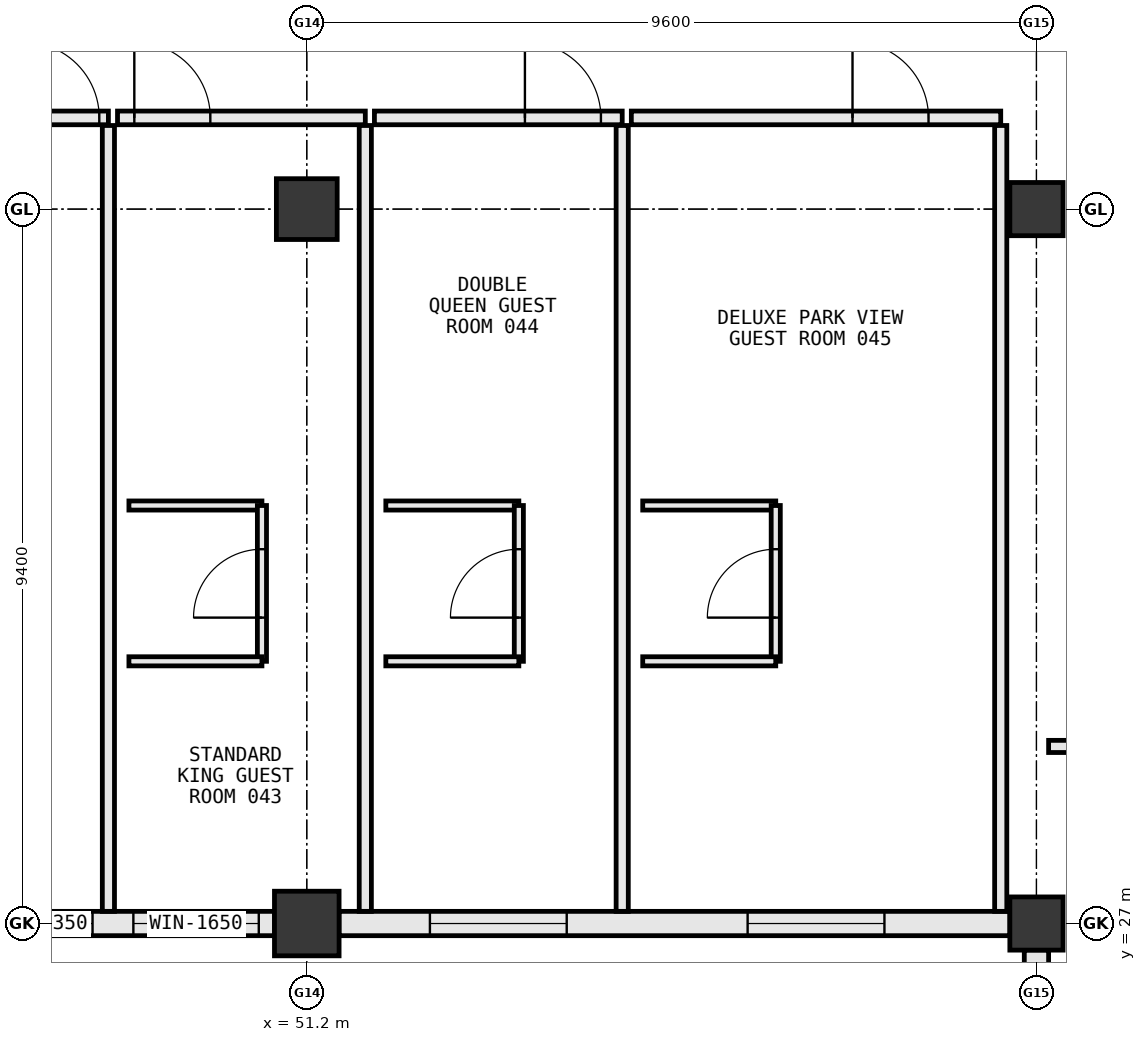
"""IFC4 building model, lengths in metres.
Left out: names, types, materials, properties, quantities, classifications, styles, units other than length and angle.
Written with IfcOpenShell. Run it as: python <this file> out.ifc"""

import sys

from ifc_helpers import new_model, si_unit, direction, frame, frame_2d, origin, origin_2d, place, context, subcontext, project, spatial, rectangle, extrude, element, fill, save


model = new_model("IFC4")
c1 = context("Model", 3, precision=1e-05, world=origin(), true_north=direction((0.0, 1.0)))
c2 = subcontext(c1, "Body", "Model", "MODEL_VIEW")
j1 = project(units=[si_unit("LENGTHUNIT", "METRE"), si_unit("PLANEANGLEUNIT", "RADIAN")], contexts=[c1])
p1 = place(None, origin())
s1 = spatial("IfcSite", under=j1, at=p1, CompositionType="ELEMENT")
p2 = place(p1, origin())
s2 = spatial("IfcBuilding", under=s1, at=p2, CompositionType="ELEMENT")
p3 = place(p2, frame((0.0, 0.0, 10.8)))
s3 = spatial("IfcBuildingStorey", under=s2, at=p3, CompositionType="ELEMENT", Elevation=10.8)
for number, where, z_axis, x_axis in (
    (1, (60.8, 27.0, 0.0), (0.0, 0.0, 1.0), (1.0, 0.0, 0.0)),
    (2, (60.8, 36.4, 0.0), (0.0, 0.0, 1.0), (1.0, 0.0, 0.0)),
):
    element("IfcColumn", number, at=place(p3, frame(where, z_axis=z_axis, x_axis=x_axis)), inside=s3, PredefinedType="COLUMN", context=c2, shape_type="SweptSolid", body=[
        extrude(rectangle(XDim=0.7, YDim=0.7, at=origin_2d()), origin(), (0.0, 0.0, 1.0), 5.4),
    ])
p4 = place(p3, frame((51.2, 27.0, 0.0), z_axis=(0.0, 0.0, 1.0), x_axis=(1.0, 0.0, 0.0)))
e3 = element("IfcColumn", 3, at=p4, inside=s3, PredefinedType="COLUMN", context=c2, shape_type="SweptSolid", body=[
    extrude(rectangle(XDim=0.85, YDim=0.85, at=origin_2d()), origin(), (0.0, 0.0, 1.0), 5.4),
])
p5 = place(p3, frame((51.2, 36.4, 0.0), z_axis=(0.0, 0.0, 1.0), x_axis=(1.0, 0.0, 0.0)))
e4 = element("IfcColumn", 4, at=p5, inside=s3, PredefinedType="COLUMN", context=c2, shape_type="SweptSolid", body=[
    extrude(rectangle(XDim=0.8, YDim=0.8, at=origin_2d()), origin(), (0.0, 0.0, 1.0), 5.4),
])
p6 = place(p3, frame((46.823, 27.0, 0.0), z_axis=(0.0, 0.0, 1.0), x_axis=(1.0, 0.0, 0.0)))
e5 = element("IfcWall", 5, at=p6, inside=s3, PredefinedType="STANDARD", context=c2, shape_type="SweptSolid", body=[
    extrude(rectangle(XDim=3.954, YDim=0.32, at=frame_2d((1.977, 0.0))), origin(), (0.0, 0.0, 1.0), 4.183),
])
p7 = place(p6, frame((0.208, 0.0, 0.85)))
e6 = element("IfcOpeningElement", 6, at=p7, cuts=e5, PredefinedType="OPENING", context=c2, shape_type="SweptSolid", body=[
    extrude(rectangle(XDim=1.35, YDim=1.65, at=frame_2d((0.675, 0.825))), frame((0.0, 0.172, 0.0), z_axis=(0.0, -1.0, 0.0), x_axis=(1.0, 0.0, 0.0)), (0.0, 0.0, 1.0), 0.344),
])
p8 = place(p6, frame((2.095, 0.0, 0.85)))
e7 = element("IfcOpeningElement", 7, at=p8, cuts=e5, PredefinedType="OPENING", context=c2, shape_type="SweptSolid", body=[
    extrude(rectangle(XDim=1.65, YDim=1.8, at=frame_2d((0.825, 0.9))), frame((0.0, 0.172, 0.0), z_axis=(0.0, -1.0, 0.0), x_axis=(1.0, 0.0, 0.0)), (0.0, 0.0, 1.0), 0.344),
])
p9 = place(p3, frame((51.623, 27.0, 0.0), z_axis=(0.0, 0.0, 1.0), x_axis=(1.0, 0.0, 0.0)))
e8 = element("IfcWall", 8, at=p9, inside=s3, PredefinedType="STANDARD", context=c2, shape_type="SweptSolid", body=[
    extrude(rectangle(XDim=8.829, YDim=0.32, at=frame_2d((4.415, 0.0))), origin(), (0.0, 0.0, 1.0), 4.075),
])
p10 = place(p9, frame((1.197, 0.0, 0.85)))
e9 = element("IfcOpeningElement", 9, at=p10, cuts=e8, PredefinedType="OPENING", context=c2, shape_type="SweptSolid", body=[
    extrude(rectangle(XDim=1.8, YDim=1.85, at=frame_2d((0.9, 0.925))), frame((0.0, 0.172, 0.0), z_axis=(0.0, -1.0, 0.0), x_axis=(1.0, 0.0, 0.0)), (0.0, 0.0, 1.0), 0.344),
])
p11 = place(p9, frame((5.377, 0.0, 0.85)))
e10 = element("IfcOpeningElement", 10, at=p11, cuts=e8, PredefinedType="OPENING", context=c2, shape_type="SweptSolid", body=[
    extrude(rectangle(XDim=1.8, YDim=1.85, at=frame_2d((0.9, 0.925))), frame((0.0, 0.172, 0.0), z_axis=(0.0, -1.0, 0.0), x_axis=(1.0, 0.0, 0.0)), (0.0, 0.0, 1.0), 0.344),
])
p12 = place(p3, frame((60.8, 26.652, 0.0), z_axis=(0.0, 0.0, 1.0), x_axis=(0.0, -1.0, 0.0)))
e11 = element("IfcWall", 11, at=p12, inside=s3, PredefinedType="STANDARD", context=c2, shape_type="SweptSolid", body=[
    extrude(rectangle(XDim=7.704, YDim=0.32, at=frame_2d((3.852, 0.0))), origin(), (0.0, 0.0, 1.0), 4.255),
])
p13 = place(p12, frame((6.478, 0.0, 0.85)))
e12 = element("IfcOpeningElement", 12, at=p13, cuts=e11, PredefinedType="OPENING", context=c2, shape_type="SweptSolid", body=[
    extrude(rectangle(XDim=1.05, YDim=1.45, at=frame_2d((0.525, 0.725))), frame((0.0, 0.172, 0.0), z_axis=(0.0, -1.0, 0.0), x_axis=(1.0, 0.0, 0.0)), (0.0, 0.0, 1.0), 0.344),
])
p14 = place(p12, frame((3.652, 0.0, 0.85)))
e13 = element("IfcOpeningElement", 13, at=p14, cuts=e11, PredefinedType="OPENING", context=c2, shape_type="SweptSolid", body=[
    extrude(rectangle(XDim=1.8, YDim=1.85, at=frame_2d((0.9, 0.925))), frame((0.0, 0.172, 0.0), z_axis=(0.0, -1.0, 0.0), x_axis=(1.0, 0.0, 0.0)), (0.0, 0.0, 1.0), 0.344),
])
p15 = place(p12, frame((0.501, 0.0, 0.85)))
e14 = element("IfcOpeningElement", 14, at=p15, cuts=e11, PredefinedType="OPENING", context=c2, shape_type="SweptSolid", body=[
    extrude(rectangle(XDim=1.8, YDim=1.85, at=frame_2d((0.9, 0.925))), frame((0.0, 0.172, 0.0), z_axis=(0.0, -1.0, 0.0), x_axis=(1.0, 0.0, 0.0)), (0.0, 0.0, 1.0), 0.344),
])
p16 = place(p3, frame((60.96, 29.33, 0.0), z_axis=(0.0, 0.0, 1.0), x_axis=(1.0, 0.0, 0.0)))
e15 = element("IfcWall", 15, at=p16, inside=s3, PredefinedType="PARTITIONING", context=c2, shape_type="SweptSolid", body=[
    extrude(rectangle(XDim=6.94, YDim=0.16, at=frame_2d((3.47, 0.0))), origin(), (0.0, 0.0, 1.0), 4.8),
])
p17 = place(p3, frame((48.59, 37.6, 0.0), z_axis=(0.0, 0.0, 1.0), x_axis=(-1.0, 0.0, 0.0)))
e16 = element("IfcWall", 16, at=p17, inside=s3, PredefinedType="PARTITIONING", context=c2, shape_type="SweptSolid", body=[
    extrude(rectangle(XDim=3.26, YDim=0.18, at=frame_2d((1.63, 0.0))), origin(), (0.0, 0.0, 1.0), 4.8),
])
p18 = place(p17, frame((0.12, 0.0, 0.0)))
e17 = element("IfcOpeningElement", 17, at=p18, cuts=e16, PredefinedType="OPENING", context=c2, shape_type="SweptSolid", body=[
    extrude(rectangle(XDim=1.0, YDim=2.2, at=frame_2d((0.5, 1.1))), frame((0.0, 0.102, 0.0), z_axis=(0.0, -1.0, 0.0), x_axis=(1.0, 0.0, 0.0)), (0.0, 0.0, 1.0), 0.204),
])
p19 = place(p3, frame((48.59, 27.16, 0.0), z_axis=(0.0, 0.0, 1.0), x_axis=(0.0, 1.0, 0.0)))
e18 = element("IfcWall", 18, at=p19, inside=s3, PredefinedType="PARTITIONING", context=c2, shape_type="SweptSolid", body=[
    extrude(rectangle(XDim=10.34, YDim=0.16, at=frame_2d((5.17, 0.0))), origin(), (0.0, 0.0, 1.0), 4.378),
])
p20 = place(p3, frame((51.97, 37.6, 0.0), z_axis=(0.0, 0.0, 1.0), x_axis=(-1.0, 0.0, 0.0)))
e19 = element("IfcWall", 19, at=p20, inside=s3, PredefinedType="PARTITIONING", context=c2, shape_type="SweptSolid", body=[
    extrude(rectangle(XDim=3.26, YDim=0.18, at=frame_2d((1.63, 0.0))), origin(), (0.0, 0.0, 1.0), 4.8),
])
p21 = place(p20, frame((2.039, 0.0, 0.0)))
e20 = element("IfcOpeningElement", 20, at=p21, cuts=e19, PredefinedType="OPENING", context=c2, shape_type="SweptSolid", body=[
    extrude(rectangle(XDim=1.0, YDim=2.2, at=frame_2d((0.5, 1.1))), frame((0.0, 0.102, 0.0), z_axis=(0.0, -1.0, 0.0), x_axis=(1.0, 0.0, 0.0)), (0.0, 0.0, 1.0), 0.204),
])
p22 = place(p3, frame((51.97, 27.16, 0.0), z_axis=(0.0, 0.0, 1.0), x_axis=(0.0, 1.0, 0.0)))
e21 = element("IfcWall", 21, at=p22, inside=s3, PredefinedType="PARTITIONING", context=c2, shape_type="SweptSolid", body=[
    extrude(rectangle(XDim=10.34, YDim=0.16, at=frame_2d((5.17, 0.0))), origin(), (0.0, 0.0, 1.0), 4.8),
])
p23 = place(p3, frame((48.86, 32.5, 0.0), z_axis=(0.0, 0.0, 1.0), x_axis=(1.0, 0.0, 0.0)))
e22 = element("IfcWall", 22, at=p23, inside=s3, PredefinedType="PARTITIONING", context=c2, shape_type="SweptSolid", body=[
    extrude(rectangle(XDim=1.75, YDim=0.12, at=frame_2d((0.875, 0.0))), origin(), (0.0, 0.0, 1.0), 4.8),
])
p24 = place(p3, frame((50.61, 30.45, 0.0), z_axis=(0.0, 0.0, 1.0), x_axis=(0.0, 1.0, 0.0)))
e23 = element("IfcWall", 23, at=p24, inside=s3, PredefinedType="PARTITIONING", context=c2, shape_type="SweptSolid", body=[
    extrude(rectangle(XDim=2.05, YDim=0.12, at=frame_2d((1.025, 0.0))), origin(), (0.0, 0.0, 1.0), 4.8),
])
p25 = place(p24, frame((0.575, 0.0, 0.0)))
e24 = element("IfcOpeningElement", 24, at=p25, cuts=e23, PredefinedType="OPENING", context=c2, shape_type="SweptSolid", body=[
    extrude(rectangle(XDim=0.9, YDim=2.15, at=frame_2d((0.45, 1.075))), frame((0.0, 0.072, 0.0), z_axis=(0.0, -1.0, 0.0), x_axis=(1.0, 0.0, 0.0)), (0.0, 0.0, 1.0), 0.144),
])
p26 = place(p3, frame((48.86, 30.45, 0.0), z_axis=(0.0, 0.0, 1.0), x_axis=(1.0, 0.0, 0.0)))
e25 = element("IfcWall", 25, at=p26, inside=s3, PredefinedType="PARTITIONING", context=c2, shape_type="SweptSolid", body=[
    extrude(rectangle(XDim=1.75, YDim=0.12, at=frame_2d((0.875, 0.0))), origin(), (0.0, 0.0, 1.0), 4.8),
])
p27 = place(p3, frame((55.35, 37.6, 0.0), z_axis=(0.0, 0.0, 1.0), x_axis=(-1.0, 0.0, 0.0)))
e26 = element("IfcWall", 26, at=p27, inside=s3, PredefinedType="PARTITIONING", context=c2, shape_type="SweptSolid", body=[
    extrude(rectangle(XDim=3.26, YDim=0.18, at=frame_2d((1.63, 0.0))), origin(), (0.0, 0.0, 1.0), 4.8),
])
p28 = place(p27, frame((0.28, 0.0, 0.0)))
e27 = element("IfcOpeningElement", 27, at=p28, cuts=e26, PredefinedType="OPENING", context=c2, shape_type="SweptSolid", body=[
    extrude(rectangle(XDim=1.0, YDim=2.2, at=frame_2d((0.5, 1.1))), frame((0.0, 0.102, 0.0), z_axis=(0.0, -1.0, 0.0), x_axis=(1.0, 0.0, 0.0)), (0.0, 0.0, 1.0), 0.204),
])
p29 = place(p3, frame((55.35, 27.16, 0.0), z_axis=(0.0, 0.0, 1.0), x_axis=(0.0, 1.0, 0.0)))
e28 = element("IfcWall", 28, at=p29, inside=s3, PredefinedType="PARTITIONING", context=c2, shape_type="SweptSolid", body=[
    extrude(rectangle(XDim=10.34, YDim=0.16, at=frame_2d((5.17, 0.0))), origin(), (0.0, 0.0, 1.0), 4.8),
])
p30 = place(p3, frame((52.24, 32.5, 0.0), z_axis=(0.0, 0.0, 1.0), x_axis=(1.0, 0.0, 0.0)))
e29 = element("IfcWall", 29, at=p30, inside=s3, PredefinedType="PARTITIONING", context=c2, shape_type="SweptSolid", body=[
    extrude(rectangle(XDim=1.75, YDim=0.12, at=frame_2d((0.875, 0.0))), origin(), (0.0, 0.0, 1.0), 4.8),
])
p31 = place(p3, frame((53.99, 30.45, 0.0), z_axis=(0.0, 0.0, 1.0), x_axis=(0.0, 1.0, 0.0)))
e30 = element("IfcWall", 30, at=p31, inside=s3, PredefinedType="PARTITIONING", context=c2, shape_type="SweptSolid", body=[
    extrude(rectangle(XDim=2.05, YDim=0.12, at=frame_2d((1.025, 0.0))), origin(), (0.0, 0.0, 1.0), 4.345),
])
p32 = place(p31, frame((0.575, 0.0, 0.0)))
e31 = element("IfcOpeningElement", 31, at=p32, cuts=e30, PredefinedType="OPENING", context=c2, shape_type="SweptSolid", body=[
    extrude(rectangle(XDim=0.9, YDim=2.15, at=frame_2d((0.45, 1.075))), frame((0.0, 0.072, 0.0), z_axis=(0.0, -1.0, 0.0), x_axis=(1.0, 0.0, 0.0)), (0.0, 0.0, 1.0), 0.144),
])
p33 = place(p3, frame((52.24, 30.45, 0.0), z_axis=(0.0, 0.0, 1.0), x_axis=(1.0, 0.0, 0.0)))
e32 = element("IfcWall", 32, at=p33, inside=s3, PredefinedType="PARTITIONING", context=c2, shape_type="SweptSolid", body=[
    extrude(rectangle(XDim=1.75, YDim=0.12, at=frame_2d((0.875, 0.0))), origin(), (0.0, 0.0, 1.0), 4.8),
])
p34 = place(p3, frame((60.33, 37.6, 0.0), z_axis=(0.0, 0.0, 1.0), x_axis=(-1.0, 0.0, 0.0)))
e33 = element("IfcWall", 33, at=p34, inside=s3, PredefinedType="PARTITIONING", context=c2, shape_type="SweptSolid", body=[
    extrude(rectangle(XDim=4.86, YDim=0.18, at=frame_2d((2.43, 0.0))), origin(), (0.0, 0.0, 1.0), 4.8),
])
p35 = place(p34, frame((0.95, 0.0, 0.0)))
e34 = element("IfcOpeningElement", 34, at=p35, cuts=e33, PredefinedType="OPENING", context=c2, shape_type="SweptSolid", body=[
    extrude(rectangle(XDim=1.0, YDim=2.2, at=frame_2d((0.5, 1.1))), frame((0.0, 0.102, 0.0), z_axis=(0.0, -1.0, 0.0), x_axis=(1.0, 0.0, 0.0)), (0.0, 0.0, 1.0), 0.204),
])
p36 = place(p3, frame((60.33, 27.16, 0.0), z_axis=(0.0, 0.0, 1.0), x_axis=(0.0, 1.0, 0.0)))
e35 = element("IfcWall", 35, at=p36, inside=s3, PredefinedType="PARTITIONING", context=c2, shape_type="SweptSolid", body=[
    extrude(rectangle(XDim=10.34, YDim=0.16, at=frame_2d((5.17, 0.0))), origin(), (0.0, 0.0, 1.0), 4.8),
])
p37 = place(p3, frame((55.62, 32.5, 0.0), z_axis=(0.0, 0.0, 1.0), x_axis=(1.0, 0.0, 0.0)))
e36 = element("IfcWall", 36, at=p37, inside=s3, PredefinedType="PARTITIONING", context=c2, shape_type="SweptSolid", body=[
    extrude(rectangle(XDim=1.75, YDim=0.12, at=frame_2d((0.875, 0.0))), origin(), (0.0, 0.0, 1.0), 4.8),
])
p38 = place(p3, frame((57.37, 30.45, 0.0), z_axis=(0.0, 0.0, 1.0), x_axis=(0.0, 1.0, 0.0)))
e37 = element("IfcWall", 37, at=p38, inside=s3, PredefinedType="PARTITIONING", context=c2, shape_type="SweptSolid", body=[
    extrude(rectangle(XDim=2.05, YDim=0.12, at=frame_2d((1.025, 0.0))), origin(), (0.0, 0.0, 1.0), 4.345),
])
p39 = place(p38, frame((0.575, 0.0, 0.0)))
e38 = element("IfcOpeningElement", 38, at=p39, cuts=e37, PredefinedType="OPENING", context=c2, shape_type="SweptSolid", body=[
    extrude(rectangle(XDim=0.9, YDim=2.15, at=frame_2d((0.45, 1.075))), frame((0.0, 0.072, 0.0), z_axis=(0.0, -1.0, 0.0), x_axis=(1.0, 0.0, 0.0)), (0.0, 0.0, 1.0), 0.144),
])
p40 = place(p3, frame((55.62, 30.45, 0.0), z_axis=(0.0, 0.0, 1.0), x_axis=(1.0, 0.0, 0.0)))
e39 = element("IfcWall", 39, at=p40, inside=s3, PredefinedType="PARTITIONING", context=c2, shape_type="SweptSolid", body=[
    extrude(rectangle(XDim=1.75, YDim=0.12, at=frame_2d((0.875, 0.0))), origin(), (0.0, 0.0, 1.0), 4.8),
])
p41 = place(p7, origin())
e40 = element("IfcWindow", 40, at=p41, inside=s3, PartitioningType="SINGLE_PANEL", PredefinedType="WINDOW", context=c2, shape_type="SweptSolid", body=[
    extrude(rectangle(XDim=1.35, YDim=1.65, at=frame_2d((0.675, 0.825))), frame((0.0, 0.03, 0.0), z_axis=(0.0, -1.0, 0.0), x_axis=(1.0, 0.0, 0.0)), (0.0, 0.0, 1.0), 0.06),
])
fill(e6, e40)
p42 = place(p8, origin())
e41 = element("IfcWindow", 41, at=p42, inside=s3, PartitioningType="SINGLE_PANEL", PredefinedType="WINDOW", context=c2, shape_type="SweptSolid", body=[
    extrude(rectangle(XDim=1.65, YDim=1.8, at=frame_2d((0.825, 0.9))), frame((0.0, 0.03, 0.0), z_axis=(0.0, -1.0, 0.0), x_axis=(1.0, 0.0, 0.0)), (0.0, 0.0, 1.0), 0.06),
])
fill(e7, e41)
p43 = place(p10, origin())
e42 = element("IfcWindow", 42, at=p43, inside=s3, PartitioningType="SINGLE_PANEL", PredefinedType="WINDOW", context=c2, shape_type="SweptSolid", body=[
    extrude(rectangle(XDim=1.8, YDim=1.85, at=frame_2d((0.9, 0.925))), frame((0.0, 0.03, 0.0), z_axis=(0.0, -1.0, 0.0), x_axis=(1.0, 0.0, 0.0)), (0.0, 0.0, 1.0), 0.06),
])
fill(e9, e42)
p44 = place(p11, origin())
e43 = element("IfcWindow", 43, at=p44, inside=s3, PartitioningType="SINGLE_PANEL", PredefinedType="WINDOW", context=c2, shape_type="SweptSolid", body=[
    extrude(rectangle(XDim=1.8, YDim=1.85, at=frame_2d((0.9, 0.925))), frame((0.0, 0.03, 0.0), z_axis=(0.0, -1.0, 0.0), x_axis=(1.0, 0.0, 0.0)), (0.0, 0.0, 1.0), 0.06),
])
fill(e10, e43)
p45 = place(p18, frame((1.0, 0.0, 0.0), z_axis=(0.0, 0.0, 1.0), x_axis=(-1.0, 0.0, 0.0)))
e44 = element("IfcDoor", 44, at=p45, inside=s3, OperationType="SINGLE_SWING_RIGHT", PredefinedType="DOOR", context=c2, shape_type="SweptSolid", body=[
    extrude(rectangle(XDim=1.0, YDim=2.2, at=frame_2d((0.5, 1.1))), frame((0.0, 0.025, 0.0), z_axis=(0.0, -1.0, 0.0), x_axis=(1.0, 0.0, 0.0)), (0.0, 0.0, 1.0), 0.05),
])
fill(e17, e44)
p46 = place(p21, frame((1.0, 0.0, 0.0), z_axis=(0.0, 0.0, 1.0), x_axis=(-1.0, 0.0, 0.0)))
e45 = element("IfcDoor", 45, at=p46, inside=s3, OperationType="SINGLE_SWING_RIGHT", PredefinedType="DOOR", context=c2, shape_type="SweptSolid", body=[
    extrude(rectangle(XDim=1.0, YDim=2.2, at=frame_2d((0.5, 1.1))), frame((0.0, 0.025, 0.0), z_axis=(0.0, -1.0, 0.0), x_axis=(1.0, 0.0, 0.0)), (0.0, 0.0, 1.0), 0.05),
])
fill(e20, e45)
p47 = place(p25, origin())
e46 = element("IfcDoor", 46, at=p47, inside=s3, OperationType="SINGLE_SWING_LEFT", PredefinedType="DOOR", context=c2, shape_type="SweptSolid", body=[
    extrude(rectangle(XDim=0.9, YDim=2.15, at=frame_2d((0.45, 1.075))), frame((0.0, 0.025, 0.0), z_axis=(0.0, -1.0, 0.0), x_axis=(1.0, 0.0, 0.0)), (0.0, 0.0, 1.0), 0.05),
])
fill(e24, e46)
p48 = place(p28, frame((1.0, 0.0, 0.0), z_axis=(0.0, 0.0, 1.0), x_axis=(-1.0, 0.0, 0.0)))
e47 = element("IfcDoor", 47, at=p48, inside=s3, OperationType="SINGLE_SWING_RIGHT", PredefinedType="DOOR", context=c2, shape_type="SweptSolid", body=[
    extrude(rectangle(XDim=1.0, YDim=2.2, at=frame_2d((0.5, 1.1))), frame((0.0, 0.025, 0.0), z_axis=(0.0, -1.0, 0.0), x_axis=(1.0, 0.0, 0.0)), (0.0, 0.0, 1.0), 0.05),
])
fill(e27, e47)
p49 = place(p32, origin())
e48 = element("IfcDoor", 48, at=p49, inside=s3, OperationType="SINGLE_SWING_LEFT", PredefinedType="DOOR", context=c2, shape_type="SweptSolid", body=[
    extrude(rectangle(XDim=0.9, YDim=2.15, at=frame_2d((0.45, 1.075))), frame((0.0, 0.025, 0.0), z_axis=(0.0, -1.0, 0.0), x_axis=(1.0, 0.0, 0.0)), (0.0, 0.0, 1.0), 0.05),
])
fill(e31, e48)
p50 = place(p35, frame((1.0, 0.0, 0.0), z_axis=(0.0, 0.0, 1.0), x_axis=(-1.0, 0.0, 0.0)))
e49 = element("IfcDoor", 49, at=p50, inside=s3, OperationType="SINGLE_SWING_RIGHT", PredefinedType="DOOR", context=c2, shape_type="SweptSolid", body=[
    extrude(rectangle(XDim=1.0, YDim=2.2, at=frame_2d((0.5, 1.1))), frame((0.0, 0.025, 0.0), z_axis=(0.0, -1.0, 0.0), x_axis=(1.0, 0.0, 0.0)), (0.0, 0.0, 1.0), 0.05),
])
fill(e34, e49)
p51 = place(p39, origin())
e50 = element("IfcDoor", 50, at=p51, inside=s3, OperationType="SINGLE_SWING_LEFT", PredefinedType="DOOR", context=c2, shape_type="SweptSolid", body=[
    extrude(rectangle(XDim=0.9, YDim=2.15, at=frame_2d((0.45, 1.075))), frame((0.0, 0.025, 0.0), z_axis=(0.0, -1.0, 0.0), x_axis=(1.0, 0.0, 0.0)), (0.0, 0.0, 1.0), 0.05),
])
fill(e38, e50)
save(model, sys.argv[1])
